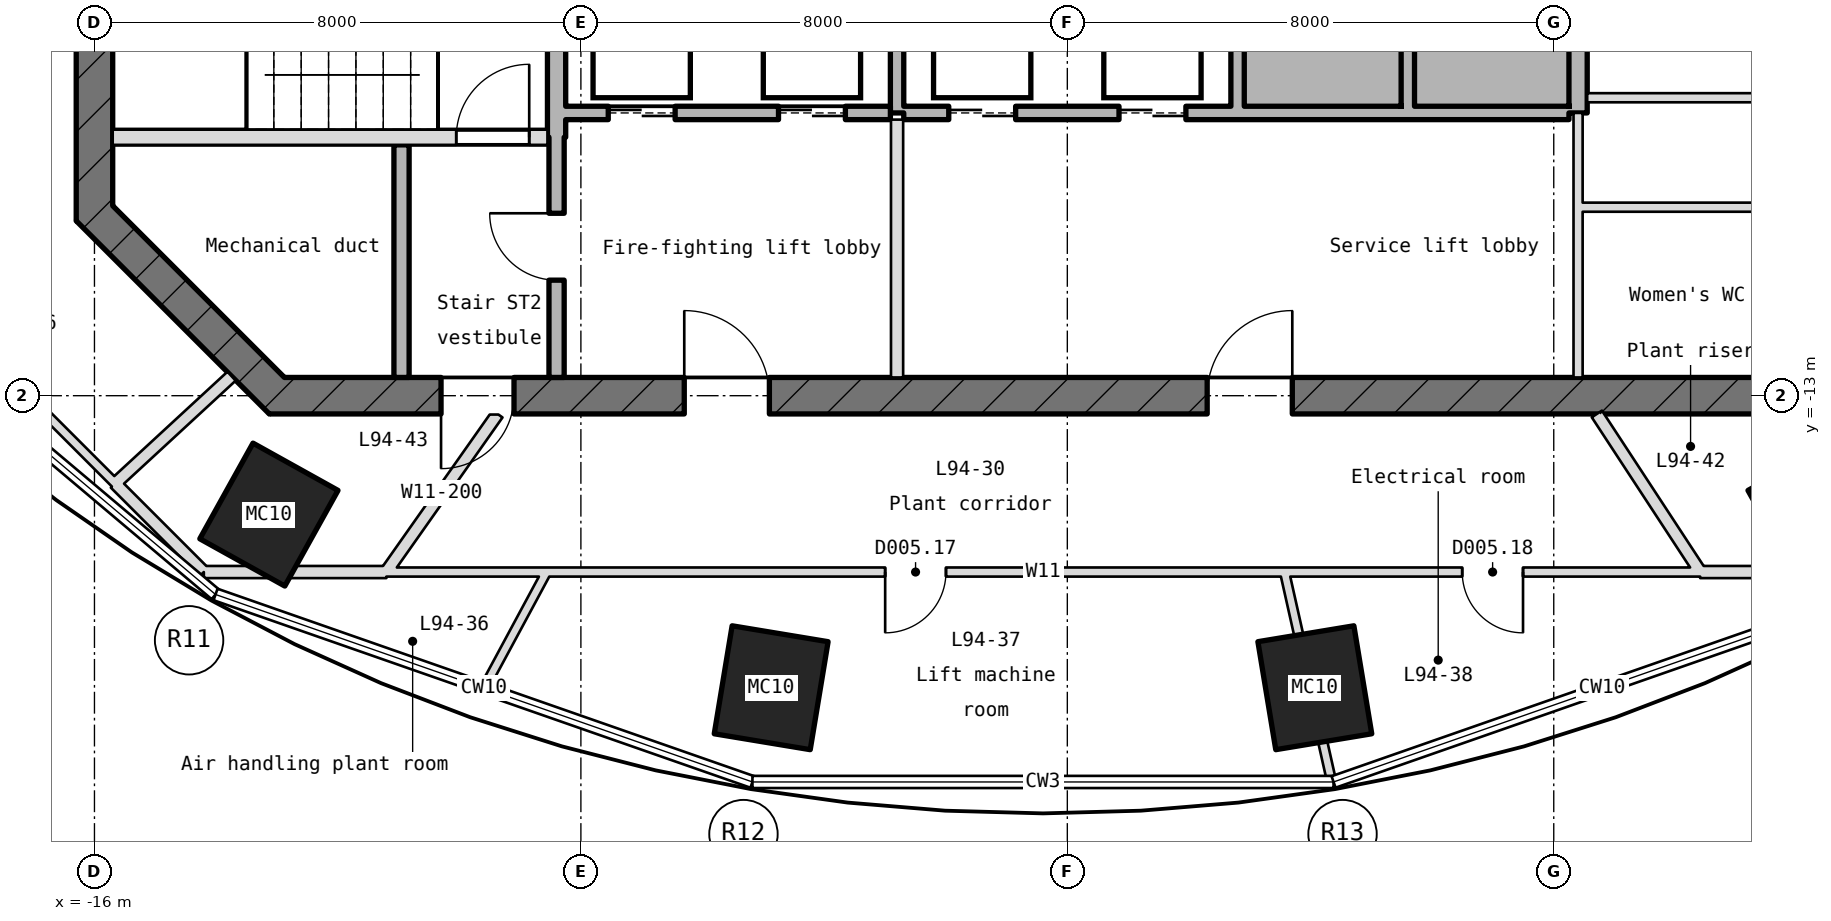
"""IFC4 building model, lengths in metres.
Left out: names, types, materials, properties, quantities, classifications, styles, units other than length and angle.
Written with IfcOpenShell. Run it as: python <this file> out.ifc"""

import sys

from ifc_helpers import new_model, si_unit, direction, frame, frame_2d, origin, origin_2d, place, context, subcontext, project, spatial, rectangle, hollow_rectangle, extrude, element, fill, save


model = new_model("IFC4")
c1 = context("Model", 3, precision=1e-05, world=origin(), true_north=direction((0.0, 1.0)))
c2 = subcontext(c1, "Body", "Model", "MODEL_VIEW")
j1 = project(units=[si_unit("LENGTHUNIT", "METRE"), si_unit("PLANEANGLEUNIT", "RADIAN")], contexts=[c1])
p1 = place(None, origin())
s1 = spatial("IfcSite", under=j1, at=p1, CompositionType="ELEMENT")
p2 = place(p1, origin())
s2 = spatial("IfcBuilding", under=s1, at=p2, CompositionType="ELEMENT")
p3 = place(p2, frame((0.0, 0.0, 418.55)))
s3 = spatial("IfcBuildingStorey", under=s2, at=p3, CompositionType="ELEMENT", Elevation=418.55)
for number, where, z_axis, x_axis in (
    (1, (-13.131, -14.955, -0.2), (0.0, 0.0, 1.0), (-0.874, 0.486, 0.0)),
    (2, (-4.871, -17.802, -0.2), (0.0, 0.0, 1.0), (-0.987, 0.163, 0.0)),
    (3, (4.071, -17.802, -0.2), (0.0, 0.0, 1.0), (-0.987, -0.163, 0.0)),
    (4, (12.331, -14.955, -0.2), (0.0, 0.0, 1.0), (-0.874, -0.486, 0.0)),
):
    element("IfcColumn", number, at=place(p3, frame(where, z_axis=z_axis, x_axis=x_axis)), inside=s3, PredefinedType="COLUMN", context=c2, shape_type="SweptSolid", body=[
        extrude(hollow_rectangle(XDim=1.6, YDim=1.8, WallThickness=0.045, at=origin_2d()), origin(), (0.0, 0.0, 1.0), 4.9),
    ])
p4 = place(p3, frame((-16.0, 10.124, -0.2), z_axis=(0.0, 0.0, 1.0), x_axis=(0.0, -1.0, 0.0)))
e5 = element("IfcWall", 5, at=p4, inside=s3, PredefinedType="SHEAR", context=c2, shape_type="SweptSolid", body=[
    extrude(rectangle(XDim=20.249, YDim=0.6, at=frame_2d((10.124, 0.0))), origin(), (0.0, 0.0, 1.0), 4.9),
])
p5 = place(p4, frame((8.924, 0.0, 0.2)))
e6 = element("IfcOpeningElement", 6, at=p5, cuts=e5, PredefinedType="OPENING", context=c2, shape_type="SweptSolid", body=[
    extrude(rectangle(XDim=2.4, YDim=2.1, at=frame_2d((1.2, 1.05))), frame((0.0, 0.31, 0.0), z_axis=(0.0, -1.0, 0.0), x_axis=(1.0, 0.0, 0.0)), (0.0, 0.0, 1.0), 0.62),
])
p6 = place(p4, frame((5.524, 0.0, 0.2)))
e7 = element("IfcOpeningElement", 7, at=p6, cuts=e5, PredefinedType="OPENING", context=c2, shape_type="SweptSolid", body=[
    extrude(rectangle(XDim=1.2, YDim=2.1, at=frame_2d((0.6, 1.05))), frame((0.0, 0.31, 0.0), z_axis=(0.0, -1.0, 0.0), x_axis=(1.0, 0.0, 0.0)), (0.0, 0.0, 1.0), 0.62),
])
p7 = place(p3, frame((-16.088, -9.912, -0.2), z_axis=(0.0, 0.0, 1.0), x_axis=(0.707106781187, -0.707106781187, 0.0)))
e8 = element("IfcWall", 8, at=p7, inside=s3, PredefinedType="SHEAR", context=c2, shape_type="SweptSolid", body=[
    extrude(rectangle(XDim=4.491, YDim=0.6, at=frame_2d((2.246, 0.0))), origin(), (0.0, 0.0, 1.0), 4.9),
])
p8 = place(p3, frame((-13.124, -13.0, -0.2), z_axis=(0.0, 0.0, 1.0), x_axis=(1.0, 0.0, 0.0)))
e9 = element("IfcWall", 9, at=p8, inside=s3, PredefinedType="SHEAR", context=c2, shape_type="SweptSolid", body=[
    extrude(rectangle(XDim=26.249, YDim=0.6, at=frame_2d((13.124, 0.0))), origin(), (0.0, 0.0, 1.0), 4.9),
])
p9 = place(p8, frame((2.824, 0.0, 0.2)))
e10 = element("IfcOpeningElement", 10, at=p9, cuts=e9, PredefinedType="OPENING", context=c2, shape_type="SweptSolid", body=[
    extrude(rectangle(XDim=1.2, YDim=2.1, at=frame_2d((0.6, 1.05))), frame((0.0, 0.31, 0.0), z_axis=(0.0, -1.0, 0.0), x_axis=(1.0, 0.0, 0.0)), (0.0, 0.0, 1.0), 0.62),
])
p10 = place(p8, frame((6.824, 0.0, 0.2)))
e11 = element("IfcOpeningElement", 11, at=p10, cuts=e9, PredefinedType="OPENING", context=c2, shape_type="SweptSolid", body=[
    extrude(rectangle(XDim=1.4, YDim=2.1, at=frame_2d((0.7, 1.05))), frame((0.0, 0.31, 0.0), z_axis=(0.0, -1.0, 0.0), x_axis=(1.0, 0.0, 0.0)), (0.0, 0.0, 1.0), 0.62),
])
p11 = place(p8, frame((15.424, 0.0, 0.2)))
e12 = element("IfcOpeningElement", 12, at=p11, cuts=e9, PredefinedType="OPENING", context=c2, shape_type="SweptSolid", body=[
    extrude(rectangle(XDim=1.4, YDim=2.1, at=frame_2d((0.7, 1.05))), frame((0.0, 0.31, 0.0), z_axis=(0.0, -1.0, 0.0), x_axis=(1.0, 0.0, 0.0)), (0.0, 0.0, 1.0), 0.62),
])
p12 = place(p3, frame((8.475, -9.9, 0.0), z_axis=(0.0, 0.0, 1.0), x_axis=(1.0, 0.0, 0.0)))
e13 = element("IfcWall", 13, at=p12, inside=s3, PredefinedType="PARTITIONING", context=c2, shape_type="SweptSolid", body=[
    extrude(rectangle(XDim=7.201, YDim=0.15, at=frame_2d((3.6, 0.0))), origin(), (0.0, 0.0, 1.0), 4.7),
])
p13 = place(p12, frame((3.063, 0.0, 0.0)))
e14 = element("IfcOpeningElement", 14, at=p13, cuts=e13, PredefinedType="OPENING", context=c2, shape_type="SweptSolid", body=[
    extrude(rectangle(XDim=1.0, YDim=2.1, at=frame_2d((0.5, 1.05))), frame((0.0, 0.085, 0.0), z_axis=(0.0, -1.0, 0.0), x_axis=(1.0, 0.0, 0.0)), (0.0, 0.0, 1.0), 0.17),
])
p14 = place(p3, frame((-15.7, -8.75, -0.2), z_axis=(0.0, 0.0, 1.0), x_axis=(1.0, 0.0, 0.0)))
e15 = element("IfcWall", 15, at=p14, inside=s3, PredefinedType="SHEAR", context=c2, shape_type="SweptSolid", body=[
    extrude(rectangle(XDim=7.15, YDim=0.25, at=frame_2d((3.575, 0.0))), origin(), (0.0, 0.0, 1.0), 4.9),
])
p15 = place(p14, frame((5.65, 0.0, 0.2)))
e16 = element("IfcOpeningElement", 16, at=p15, cuts=e15, PredefinedType="OPENING", context=c2, shape_type="SweptSolid", body=[
    extrude(rectangle(XDim=1.2, YDim=2.1, at=frame_2d((0.6, 1.05))), frame((0.0, 0.135, 0.0), z_axis=(0.0, -1.0, 0.0), x_axis=(1.0, 0.0, 0.0)), (0.0, 0.0, 1.0), 0.27),
])
p16 = place(p3, frame((-8.25, -8.35, 0.0), z_axis=(0.0, 0.0, 1.0), x_axis=(1.0, 0.0, 0.0)))
e17 = element("IfcWall", 17, at=p16, inside=s3, PredefinedType="STANDARD", context=c2, shape_type="SweptSolid", body=[
    extrude(rectangle(XDim=5.34, YDim=0.22, at=frame_2d((2.67, 0.0))), origin(), (0.0, 0.0, 1.0), 4.7),
])
p17 = place(p16, frame((0.7, 0.0, 0.0)))
e18 = element("IfcOpeningElement", 18, at=p17, cuts=e17, PredefinedType="OPENING", context=c2, shape_type="SweptSolid", body=[
    extrude(rectangle(XDim=1.1, YDim=2.1, at=frame_2d((0.55, 1.05))), frame((0.0, 0.12, 0.0), z_axis=(0.0, -1.0, 0.0), x_axis=(1.0, 0.0, 0.0)), (0.0, 0.0, 1.0), 0.24),
])
p18 = place(p16, frame((3.5, 0.0, 0.0)))
e19 = element("IfcOpeningElement", 19, at=p18, cuts=e17, PredefinedType="OPENING", context=c2, shape_type="SweptSolid", body=[
    extrude(rectangle(XDim=1.1, YDim=2.1, at=frame_2d((0.55, 1.05))), frame((0.0, 0.12, 0.0), z_axis=(0.0, -1.0, 0.0), x_axis=(1.0, 0.0, 0.0)), (0.0, 0.0, 1.0), 0.24),
])
p19 = place(p3, frame((-2.69, -8.35, 0.0), z_axis=(0.0, 0.0, 1.0), x_axis=(1.0, 0.0, 0.0)))
e20 = element("IfcWall", 20, at=p19, inside=s3, PredefinedType="STANDARD", context=c2, shape_type="SweptSolid", body=[
    extrude(rectangle(XDim=10.94, YDim=0.22, at=frame_2d((5.47, 0.0))), origin(), (0.0, 0.0, 1.0), 4.7),
])
p20 = place(p19, frame((0.74, 0.0, 0.0)))
e21 = element("IfcOpeningElement", 21, at=p20, cuts=e20, PredefinedType="OPENING", context=c2, shape_type="SweptSolid", body=[
    extrude(rectangle(XDim=1.1, YDim=2.1, at=frame_2d((0.55, 1.05))), frame((0.0, 0.12, 0.0), z_axis=(0.0, -1.0, 0.0), x_axis=(1.0, 0.0, 0.0)), (0.0, 0.0, 1.0), 0.24),
])
p21 = place(p19, frame((3.54, 0.0, 0.0)))
e22 = element("IfcOpeningElement", 22, at=p21, cuts=e20, PredefinedType="OPENING", context=c2, shape_type="SweptSolid", body=[
    extrude(rectangle(XDim=1.1, YDim=2.1, at=frame_2d((0.55, 1.05))), frame((0.0, 0.12, 0.0), z_axis=(0.0, -1.0, 0.0), x_axis=(1.0, 0.0, 0.0)), (0.0, 0.0, 1.0), 0.24),
])
p22 = place(p3, frame((8.55, -8.1, 0.0), z_axis=(0.0, 0.0, 1.0), x_axis=(1.0, 0.0, 0.0)))
e23 = element("IfcWall", 23, at=p22, inside=s3, PredefinedType="PARTITIONING", context=c2, shape_type="SweptSolid", body=[
    extrude(rectangle(XDim=7.15, YDim=0.15, at=frame_2d((3.575, 0.0))), origin(), (0.0, 0.0, 1.0), 4.7),
])
p23 = place(p22, frame((3.0, 0.0, 0.0)))
e24 = element("IfcOpeningElement", 24, at=p23, cuts=e23, PredefinedType="OPENING", context=c2, shape_type="SweptSolid", body=[
    extrude(rectangle(XDim=1.0, YDim=2.1, at=frame_2d((0.5, 1.05))), frame((0.0, 0.085, 0.0), z_axis=(0.0, -1.0, 0.0), x_axis=(1.0, 0.0, 0.0)), (0.0, 0.0, 1.0), 0.17),
])
p24 = place(p3, frame((-10.95, -12.7, 0.0), z_axis=(0.0, 0.0, 1.0), x_axis=(0.0, 1.0, 0.0)))
e25 = element("IfcWall", 25, at=p24, inside=s3, PredefinedType="STANDARD", context=c2, shape_type="SweptSolid", body=[
    extrude(rectangle(XDim=3.825, YDim=0.25, at=frame_2d((1.913, 0.0))), origin(), (0.0, 0.0, 1.0), 4.7),
])
p25 = place(p3, frame((-8.4, -12.7, 0.0), z_axis=(0.0, 0.0, 1.0), x_axis=(0.0, 1.0, 0.0)))
e26 = element("IfcWall", 26, at=p25, inside=s3, PredefinedType="STANDARD", context=c2, shape_type="SweptSolid", body=[
    extrude(rectangle(XDim=3.95, YDim=0.25, at=frame_2d((1.975, 0.0))), origin(), (0.0, 0.0, 1.0), 4.7),
])
p26 = place(p25, frame((1.6, 0.0, 0.0)))
e27 = element("IfcOpeningElement", 27, at=p26, cuts=e26, PredefinedType="OPENING", context=c2, shape_type="SweptSolid", body=[
    extrude(rectangle(XDim=1.1, YDim=2.1, at=frame_2d((0.55, 1.05))), frame((0.0, 0.135, 0.0), z_axis=(0.0, -1.0, 0.0), x_axis=(1.0, 0.0, 0.0)), (0.0, 0.0, 1.0), 0.27),
])
p27 = place(p3, frame((-8.4, -8.75, -0.2), z_axis=(0.0, 0.0, 1.0), x_axis=(0.0, 1.0, 0.0)))
e28 = element("IfcWall", 28, at=p27, inside=s3, PredefinedType="SHEAR", context=c2, shape_type="SweptSolid", body=[
    extrude(rectangle(XDim=6.25, YDim=0.3, at=frame_2d((3.125, 0.0))), origin(), (0.0, 0.0, 1.0), 4.9),
])
p28 = place(p3, frame((-2.8, -12.7, 0.0), z_axis=(0.0, 0.0, 1.0), x_axis=(0.0, 1.0, 0.0)))
e29 = element("IfcWall", 29, at=p28, inside=s3, PredefinedType="PARTITIONING", context=c2, shape_type="SweptSolid", body=[
    extrude(rectangle(XDim=4.24, YDim=0.2, at=frame_2d((2.12, 0.0))), origin(), (0.0, 0.0, 1.0), 4.7),
])
p29 = place(p3, frame((-2.8, -8.35, 0.0), z_axis=(0.0, 0.0, 1.0), x_axis=(0.0, 1.0, 0.0)))
e30 = element("IfcWall", 30, at=p29, inside=s3, PredefinedType="STANDARD", context=c2, shape_type="SweptSolid", body=[
    extrude(rectangle(XDim=2.89, YDim=0.22, at=frame_2d((1.445, 0.0))), origin(), (0.0, 0.0, 1.0), 4.7),
])
for number, where, z_axis, x_axis in (
    (31, (2.8, -8.24, 0.0), (0.0, 0.0, 1.0), (0.0, 1.0, 0.0)),
    (32, (5.6, -8.24, 0.0), (0.0, 0.0, 1.0), (0.0, 1.0, 0.0)),
):
    element("IfcWall", number, at=place(p3, frame(where, z_axis=z_axis, x_axis=x_axis)), inside=s3, PredefinedType="STANDARD", context=c2, shape_type="SweptSolid", body=[
        extrude(rectangle(XDim=2.78, YDim=0.22, at=frame_2d((1.39, 0.0))), origin(), (0.0, 0.0, 1.0), 4.7),
    ])
p30 = place(p3, frame((8.4, -12.7, 0.0), z_axis=(0.0, 0.0, 1.0), x_axis=(0.0, 1.0, 0.0)))
e33 = element("IfcWall", 33, at=p30, inside=s3, PredefinedType="PARTITIONING", context=c2, shape_type="SweptSolid", body=[
    extrude(rectangle(XDim=4.35, YDim=0.15, at=frame_2d((2.175, 0.0))), origin(), (0.0, 0.0, 1.0), 4.7),
])
p31 = place(p3, frame((8.4, -8.35, -0.2), z_axis=(0.0, 0.0, 1.0), x_axis=(0.0, 1.0, 0.0)))
e34 = element("IfcWall", 34, at=p31, inside=s3, PredefinedType="SHEAR", context=c2, shape_type="SweptSolid", body=[
    extrude(rectangle(XDim=5.85, YDim=0.3, at=frame_2d((2.925, 0.0))), origin(), (0.0, 0.0, 1.0), 4.9),
])
p32 = place(p3, frame((-11.202, -15.9, 0.0), z_axis=(0.0, 0.0, 1.0), x_axis=(1.0, 0.0, 0.0)))
e35 = element("IfcWall", 35, at=p32, inside=s3, PredefinedType="PARTITIONING", context=c2, shape_type="SweptSolid", body=[
    extrude(rectangle(XDim=21.614, YDim=0.15, at=frame_2d((10.807, 0.0))), origin(), (0.0, 0.0, 1.0), 4.7),
])
p33 = place(p32, frame((8.207, 0.0, 0.0)))
e36 = element("IfcOpeningElement", 36, at=p33, cuts=e35, PredefinedType="OPENING", context=c2, shape_type="SweptSolid", body=[
    extrude(rectangle(XDim=1.0, YDim=2.1, at=frame_2d((0.5, 1.05))), frame((0.0, 0.085, 0.0), z_axis=(0.0, -1.0, 0.0), x_axis=(1.0, 0.0, 0.0)), (0.0, 0.0, 1.0), 0.17),
])
p34 = place(p32, frame((17.697, 0.0, 0.0)))
e37 = element("IfcOpeningElement", 37, at=p34, cuts=e35, PredefinedType="OPENING", context=c2, shape_type="SweptSolid", body=[
    extrude(rectangle(XDim=1.0, YDim=2.1, at=frame_2d((0.5, 1.05))), frame((0.0, 0.085, 0.0), z_axis=(0.0, -1.0, 0.0), x_axis=(1.0, 0.0, 0.0)), (0.0, 0.0, 1.0), 0.17),
])
p35 = place(p3, frame((-9.584, -17.793, 0.0), z_axis=(0.0, 0.0, 1.0), x_axis=(0.474126911312, 0.880456513389, 0.0)))
e38 = element("IfcWall", 38, at=p35, inside=s3, PredefinedType="PARTITIONING", context=c2, shape_type="SweptSolid", body=[
    extrude(rectangle(XDim=2.15, YDim=0.15, at=frame_2d((1.075, 0.0))), origin(), (0.0, 0.0, 1.0), 4.7),
])
p36 = place(p3, frame((4.344, -19.332, 0.0), z_axis=(0.0, 0.0, 1.0), x_axis=(-0.219298106663, 0.975657901323, 0.0)))
e39 = element("IfcWall", 39, at=p36, inside=s3, PredefinedType="PARTITIONING", context=c2, shape_type="SweptSolid", body=[
    extrude(rectangle(XDim=1.954, YDim=0.15, at=frame_2d((0.977, 0.0))), origin(), (0.0, 0.0, 1.0), 4.7),
])
p37 = place(p3, frame((3.916, -17.426, 0.0), z_axis=(0.0, 0.0, 1.0), x_axis=(-0.219144481839, 0.975692418787, 0.0)))
e40 = element("IfcWall", 40, at=p37, inside=s3, PredefinedType="PARTITIONING", context=c2, shape_type="SweptSolid", body=[
    extrude(rectangle(XDim=1.564, YDim=0.15, at=frame_2d((0.782, 0.0))), origin(), (0.0, 0.0, 1.0), 4.347),
])
p38 = place(p3, frame((-15.658, -14.443, 0.0), z_axis=(0.0, 0.0, 1.0), x_axis=(-0.707080156687, 0.707133404684, 0.0)))
e41 = element("IfcWall", 41, at=p38, inside=s3, PredefinedType="PARTITIONING", context=c2, shape_type="SweptSolid", body=[
    extrude(rectangle(XDim=4.585, YDim=0.15, at=frame_2d((2.292, 0.0))), origin(), (0.0, 0.0, 1.0), 4.7),
])
p39 = place(p38, frame((1.79, 0.0, 0.0)))
e42 = element("IfcOpeningElement", 42, at=p39, cuts=e41, PredefinedType="OPENING", context=c2, shape_type="SweptSolid", body=[
    extrude(rectangle(XDim=1.0, YDim=2.1, at=frame_2d((0.5, 1.05))), frame((0.0, 0.085, 0.0), z_axis=(0.0, -1.0, 0.0), x_axis=(1.0, 0.0, 0.0)), (0.0, 0.0, 1.0), 0.17),
])
p40 = place(p3, frame((-14.201, -15.9, 0.0), z_axis=(0.0, 0.0, 1.0), x_axis=(1.0, 0.0, 0.0)))
e43 = element("IfcWall", 43, at=p40, inside=s3, PredefinedType="PARTITIONING", context=c2, shape_type="SweptSolid", body=[
    extrude(rectangle(XDim=3.003, YDim=0.2, at=frame_2d((1.501, 0.0))), origin(), (0.0, 0.0, 1.0), 4.7),
])
p41 = place(p3, frame((10.408, -15.9, 0.0), z_axis=(0.0, 0.0, 1.0), x_axis=(1.0, 0.0, 0.0)))
e44 = element("IfcWall", 44, at=p41, inside=s3, PredefinedType="PARTITIONING", context=c2, shape_type="SweptSolid", body=[
    extrude(rectangle(XDim=3.208, YDim=0.2, at=frame_2d((1.604, 0.0))), origin(), (0.0, 0.0, 1.0), 4.7),
])
p42 = place(p3, frame((-15.658, -14.443, 0.0), z_axis=(0.0, 0.0, 1.0), x_axis=(0.735008442526, 0.678057954319, 0.0)))
e45 = element("IfcWall", 45, at=p42, inside=s3, PredefinedType="PARTITIONING", context=c2, shape_type="SweptSolid", body=[
    extrude(rectangle(XDim=2.602, YDim=0.2, at=frame_2d((1.301, 0.0))), origin(), (0.0, 0.0, 1.0), 4.7),
])
p43 = place(p3, frame((-11.202, -15.9, 0.0), z_axis=(0.0, 0.0, 1.0), x_axis=(0.575968689272, 0.817471754239, 0.0)))
e46 = element("IfcWall", 46, at=p43, inside=s3, PredefinedType="PARTITIONING", context=c2, shape_type="SweptSolid", body=[
    extrude(rectangle(XDim=3.18, YDim=0.2, at=frame_2d((1.59, 0.0))), origin(), (0.0, 0.0, 1.0), 4.7),
])
p44 = place(p3, frame((10.411, -15.9, 0.0), z_axis=(0.0, 0.0, 1.0), x_axis=(-0.547810161897, 0.836602669445, 0.0)))
e47 = element("IfcWall", 47, at=p44, inside=s3, PredefinedType="PARTITIONING", context=c2, shape_type="SweptSolid", body=[
    extrude(rectangle(XDim=3.108, YDim=0.2, at=frame_2d((1.554, 0.0))), origin(), (0.0, 0.0, 1.0), 4.7),
])
p45 = place(p3, frame((-14.201, -15.9, 0.0), z_axis=(0.0, 0.0, 1.0), x_axis=(-0.707106781187, 0.707106781187, 0.0)))
e48 = element("IfcWall", 48, at=p45, inside=s3, PredefinedType="PARTITIONING", context=c2, shape_type="SweptSolid", body=[
    extrude(rectangle(XDim=2.063, YDim=0.2, at=frame_2d((1.031, 0.0))), origin(), (0.0, 0.0, 1.0), 4.7),
])
p46 = place(p17, origin())
e49 = element("IfcDoor", 49, at=p46, inside=s3, OperationType="DOUBLE_DOOR_SLIDING", PredefinedType="DOOR", context=c2, shape_type="SweptSolid", body=[
    extrude(rectangle(XDim=1.1, YDim=2.1, at=frame_2d((0.55, 1.05))), frame((0.0, 0.025, 0.0), z_axis=(0.0, -1.0, 0.0), x_axis=(1.0, 0.0, 0.0)), (0.0, 0.0, 1.0), 0.05),
])
fill(e18, e49)
p47 = place(p18, origin())
e50 = element("IfcDoor", 50, at=p47, inside=s3, OperationType="DOUBLE_DOOR_SLIDING", PredefinedType="DOOR", context=c2, shape_type="SweptSolid", body=[
    extrude(rectangle(XDim=1.1, YDim=2.1, at=frame_2d((0.55, 1.05))), frame((0.0, 0.025, 0.0), z_axis=(0.0, -1.0, 0.0), x_axis=(1.0, 0.0, 0.0)), (0.0, 0.0, 1.0), 0.05),
])
fill(e19, e50)
p48 = place(p20, origin())
e51 = element("IfcDoor", 51, at=p48, inside=s3, OperationType="DOUBLE_DOOR_SLIDING", PredefinedType="DOOR", context=c2, shape_type="SweptSolid", body=[
    extrude(rectangle(XDim=1.1, YDim=2.1, at=frame_2d((0.55, 1.05))), frame((0.0, 0.025, 0.0), z_axis=(0.0, -1.0, 0.0), x_axis=(1.0, 0.0, 0.0)), (0.0, 0.0, 1.0), 0.05),
])
fill(e21, e51)
p49 = place(p21, origin())
e52 = element("IfcDoor", 52, at=p49, inside=s3, OperationType="DOUBLE_DOOR_SLIDING", PredefinedType="DOOR", context=c2, shape_type="SweptSolid", body=[
    extrude(rectangle(XDim=1.1, YDim=2.1, at=frame_2d((0.55, 1.05))), frame((0.0, 0.025, 0.0), z_axis=(0.0, -1.0, 0.0), x_axis=(1.0, 0.0, 0.0)), (0.0, 0.0, 1.0), 0.05),
])
fill(e22, e52)
p50 = place(p15, origin())
e53 = element("IfcDoor", 53, at=p50, inside=s3, OperationType="SINGLE_SWING_RIGHT", PredefinedType="DOOR", context=c2, shape_type="SweptSolid", body=[
    extrude(rectangle(XDim=1.2, YDim=2.1, at=frame_2d((0.6, 1.05))), frame((0.0, 0.025, 0.0), z_axis=(0.0, -1.0, 0.0), x_axis=(1.0, 0.0, 0.0)), (0.0, 0.0, 1.0), 0.05),
])
fill(e16, e53)
p51 = place(p26, origin())
e54 = element("IfcDoor", 54, at=p51, inside=s3, OperationType="SINGLE_SWING_RIGHT", PredefinedType="DOOR", context=c2, shape_type="SweptSolid", body=[
    extrude(rectangle(XDim=1.1, YDim=2.1, at=frame_2d((0.55, 1.05))), frame((0.0, 0.025, 0.0), z_axis=(0.0, -1.0, 0.0), x_axis=(1.0, 0.0, 0.0)), (0.0, 0.0, 1.0), 0.05),
])
fill(e27, e54)
p52 = place(p9, frame((1.2, 0.0, 0.0), z_axis=(0.0, 0.0, 1.0), x_axis=(-1.0, 0.0, 0.0)))
e55 = element("IfcDoor", 55, at=p52, inside=s3, OperationType="SINGLE_SWING_LEFT", PredefinedType="DOOR", context=c2, shape_type="SweptSolid", body=[
    extrude(rectangle(XDim=1.2, YDim=2.1, at=frame_2d((0.6, 1.05))), frame((0.0, 0.025, 0.0), z_axis=(0.0, -1.0, 0.0), x_axis=(1.0, 0.0, 0.0)), (0.0, 0.0, 1.0), 0.05),
])
fill(e10, e55)
p53 = place(p10, origin())
e56 = element("IfcDoor", 56, at=p53, inside=s3, OperationType="SINGLE_SWING_RIGHT", PredefinedType="DOOR", context=c2, shape_type="SweptSolid", body=[
    extrude(rectangle(XDim=1.4, YDim=2.1, at=frame_2d((0.7, 1.05))), frame((0.0, 0.025, 0.0), z_axis=(0.0, -1.0, 0.0), x_axis=(1.0, 0.0, 0.0)), (0.0, 0.0, 1.0), 0.05),
])
fill(e11, e56)
p54 = place(p11, origin())
e57 = element("IfcDoor", 57, at=p54, inside=s3, OperationType="SINGLE_SWING_RIGHT", PredefinedType="DOOR", context=c2, shape_type="SweptSolid", body=[
    extrude(rectangle(XDim=1.4, YDim=2.1, at=frame_2d((0.7, 1.05))), frame((0.0, 0.025, 0.0), z_axis=(0.0, -1.0, 0.0), x_axis=(1.0, 0.0, 0.0)), (0.0, 0.0, 1.0), 0.05),
])
fill(e12, e57)
p55 = place(p33, frame((1.0, 0.0, 0.0), z_axis=(0.0, 0.0, 1.0), x_axis=(-1.0, 0.0, 0.0)))
e58 = element("IfcDoor", 58, at=p55, inside=s3, OperationType="SINGLE_SWING_LEFT", PredefinedType="DOOR", context=c2, shape_type="SweptSolid", body=[
    extrude(rectangle(XDim=1.0, YDim=2.1, at=frame_2d((0.5, 1.05))), frame((0.0, 0.025, 0.0), z_axis=(0.0, -1.0, 0.0), x_axis=(1.0, 0.0, 0.0)), (0.0, 0.0, 1.0), 0.05),
])
fill(e36, e58)
p56 = place(p34, frame((1.0, 0.0, 0.0), z_axis=(0.0, 0.0, 1.0), x_axis=(-1.0, 0.0, 0.0)))
e59 = element("IfcDoor", 59, at=p56, inside=s3, OperationType="SINGLE_SWING_LEFT", PredefinedType="DOOR", context=c2, shape_type="SweptSolid", body=[
    extrude(rectangle(XDim=1.0, YDim=2.1, at=frame_2d((0.5, 1.05))), frame((0.0, 0.025, 0.0), z_axis=(0.0, -1.0, 0.0), x_axis=(1.0, 0.0, 0.0)), (0.0, 0.0, 1.0), 0.05),
])
fill(e37, e59)
save(model, sys.argv[1])
